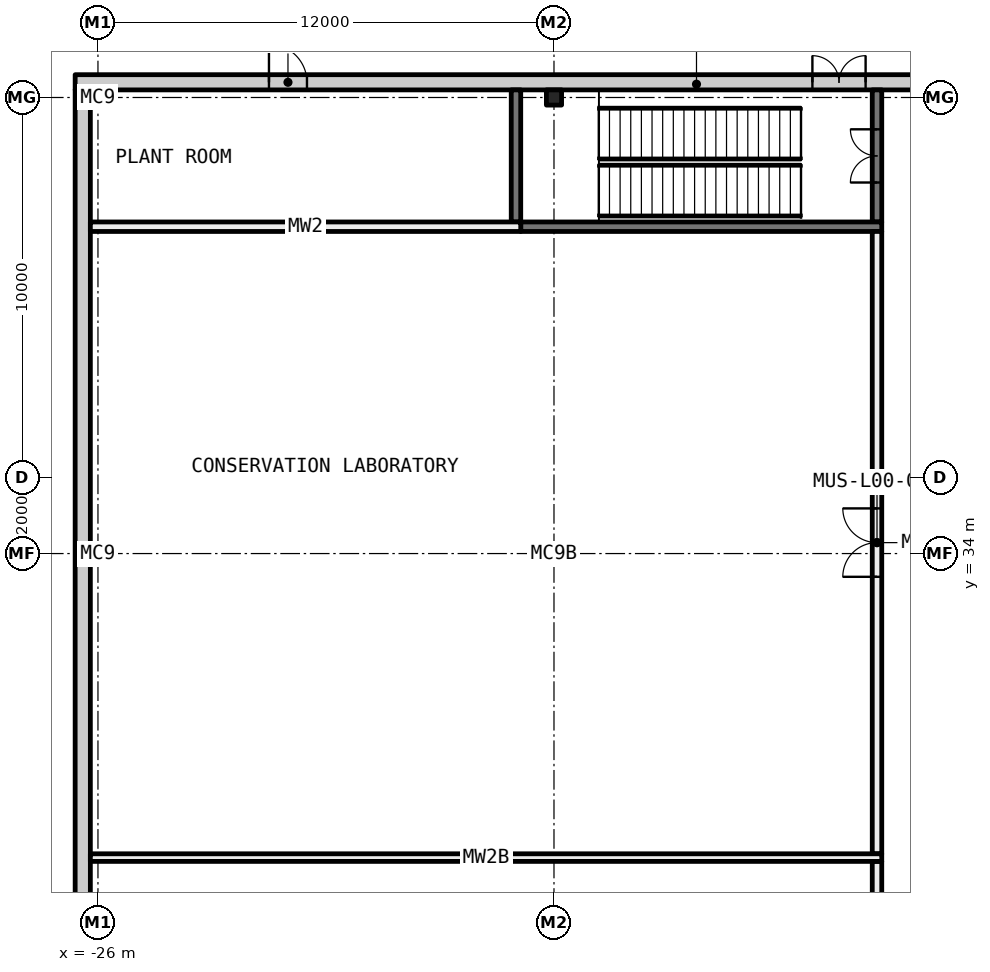
"""IFC4 building model, lengths in metres.
Left out: names, types, materials, properties, quantities, classifications, styles, units other than length and angle.
Written with IfcOpenShell. Run it as: python <this file> out.ifc"""

import sys

from ifc_helpers import new_model, si_unit, direction, frame, frame_2d, origin, origin_2d, place, context, subcontext, project, spatial, rectangle, i_section, extrude, element, fill, save


model = new_model("IFC4")
c1 = context("Model", 3, precision=1e-05, world=origin(), true_north=direction((0.0, 1.0)))
c2 = subcontext(c1, "Body", "Model", "MODEL_VIEW")
j1 = project(units=[si_unit("LENGTHUNIT", "METRE"), si_unit("PLANEANGLEUNIT", "RADIAN")], contexts=[c1])
p1 = place(None, origin())
s1 = spatial("IfcSite", under=j1, at=p1, CompositionType="ELEMENT")
p2 = place(p1, origin())
s2 = spatial("IfcBuilding", under=s1, at=p2, CompositionType="ELEMENT")
p3 = place(p2, origin())
s3 = spatial("IfcBuildingStorey", under=s2, at=p3, CompositionType="ELEMENT", Elevation=0.0)
for number, where, z_axis, x_axis in (
    (1, (-26.0, 34.0, -1.0), (0.0, 0.0, 1.0), (1.0, 0.0, 0.0)),
    (2, (-26.0, 46.0, -1.0), (0.0, 0.0, 1.0), (1.0, 0.0, 0.0)),
    (3, (-14.0, 34.0, -1.0), (0.0, 0.0, 1.0), (1.0, 0.0, 0.0)),
    (4, (-14.0, 46.0, -1.0), (0.0, 0.0, 1.0), (1.0, 0.0, 0.0)),
):
    element("IfcColumn", number, at=place(p3, frame(where, z_axis=z_axis, x_axis=x_axis)), inside=s3, PredefinedType="COLUMN", context=c2, shape_type="SweptSolid", body=[
        extrude(i_section(OverallWidth=0.4, OverallDepth=0.4, WebThickness=0.013, FlangeThickness=0.021, FilletRadius=0.022, at=origin_2d()), origin(), (0.0, 0.0, 1.0), 6.6),
    ])
p4 = place(p3, frame((-5.5, 12.1, 0.0), z_axis=(0.0, 0.0, 1.0), x_axis=(0.0, 1.0, 0.0)))
e5 = element("IfcWall", 5, at=p4, inside=s3, PredefinedType="PARTITIONING", context=c2, shape_type="SweptSolid", body=[
    extrude(rectangle(XDim=13.8, YDim=0.25, at=frame_2d((6.9, 0.0))), origin(), (0.0, 0.0, 1.0), 5.6),
])
p5 = place(p4, frame((6.0, 0.0, 0.0)))
e6 = element("IfcOpeningElement", 6, at=p5, cuts=e5, PredefinedType="OPENING", context=c2, shape_type="SweptSolid", body=[
    extrude(rectangle(XDim=1.8, YDim=2.1, at=frame_2d((0.9, 1.05))), frame((0.0, 0.135, 0.0), z_axis=(0.0, -1.0, 0.0), x_axis=(1.0, 0.0, 0.0)), (0.0, 0.0, 1.0), 0.27),
])
p6 = place(p3, frame((-5.5, 26.1, 0.0), z_axis=(0.0, 0.0, 1.0), x_axis=(0.0, 1.0, 0.0)))
e7 = element("IfcWall", 7, at=p6, inside=s3, PredefinedType="PARTITIONING", context=c2, shape_type="SweptSolid", body=[
    extrude(rectangle(XDim=16.375, YDim=0.25, at=frame_2d((8.188, 0.0))), origin(), (0.0, 0.0, 1.0), 5.6),
])
p7 = place(p6, frame((7.288, 0.0, 0.0)))
e8 = element("IfcOpeningElement", 8, at=p7, cuts=e7, PredefinedType="OPENING", context=c2, shape_type="SweptSolid", body=[
    extrude(rectangle(XDim=1.8, YDim=2.1, at=frame_2d((0.9, 1.05))), frame((0.0, 0.135, 0.0), z_axis=(0.0, -1.0, 0.0), x_axis=(1.0, 0.0, 0.0)), (0.0, 0.0, 1.0), 0.27),
])
p8 = place(p3, frame((-5.5, 42.725, -1.0), z_axis=(0.0, 0.0, 1.0), x_axis=(0.0, 1.0, 0.0)))
e9 = element("IfcWall", 9, at=p8, inside=s3, PredefinedType="SHEAR", context=c2, shape_type="SweptSolid", body=[
    extrude(rectangle(XDim=3.475, YDim=0.25, at=frame_2d((1.737, 0.0))), origin(), (0.0, 0.0, 1.0), 6.6),
])
p9 = place(p8, frame((1.038, 0.0, 1.0)))
e10 = element("IfcOpeningElement", 10, at=p9, cuts=e9, PredefinedType="OPENING", context=c2, shape_type="SweptSolid", body=[
    extrude(rectangle(XDim=1.4, YDim=2.1, at=frame_2d((0.7, 1.05))), frame((0.0, 0.135, 0.0), z_axis=(0.0, -1.0, 0.0), x_axis=(1.0, 0.0, 0.0)), (0.0, 0.0, 1.0), 0.27),
])
p10 = place(p3, frame((-26.2, 26.0, 0.0), z_axis=(0.0, 0.0, 1.0), x_axis=(1.0, 0.0, 0.0)))
e11 = element("IfcWall", 11, at=p10, inside=s3, PredefinedType="PARTITIONING", context=c2, shape_type="SweptSolid", body=[
    extrude(rectangle(XDim=20.825, YDim=0.2, at=frame_2d((10.413, 0.0))), origin(), (0.0, 0.0, 1.0), 5.6),
])
p11 = place(p3, frame((-26.2, 42.6, 0.0), z_axis=(0.0, 0.0, 1.0), x_axis=(1.0, 0.0, 0.0)))
e12 = element("IfcWall", 12, at=p11, inside=s3, PredefinedType="PARTITIONING", context=c2, shape_type="SweptSolid", body=[
    extrude(rectangle(XDim=11.325, YDim=0.25, at=frame_2d((5.663, 0.0))), origin(), (0.0, 0.0, 1.0), 5.6),
])
p12 = place(p3, frame((-14.875, 42.6, -1.0), z_axis=(0.0, 0.0, 1.0), x_axis=(1.0, 0.0, 0.0)))
e13 = element("IfcWall", 13, at=p12, inside=s3, PredefinedType="SHEAR", context=c2, shape_type="SweptSolid", body=[
    extrude(rectangle(XDim=9.5, YDim=0.25, at=frame_2d((4.75, 0.0))), origin(), (0.0, 0.0, 1.0), 6.6),
])
p13 = place(p3, frame((-15.0, 42.725, -1.0), z_axis=(0.0, 0.0, 1.0), x_axis=(0.0, 1.0, 0.0)))
e14 = element("IfcWall", 14, at=p13, inside=s3, PredefinedType="SHEAR", context=c2, shape_type="SweptSolid", body=[
    extrude(rectangle(XDim=3.475, YDim=0.25, at=frame_2d((1.737, 0.0))), origin(), (0.0, 0.0, 1.0), 6.6),
])
p14 = place(p3, frame((-26.4, -26.2, -0.4), z_axis=(0.0, 0.0, 1.0), x_axis=(0.0, 1.0, 0.0)))
e15 = element("IfcWall", 15, at=p14, inside=s3, PredefinedType="STANDARD", context=c2, shape_type="SweptSolid", body=[
    extrude(rectangle(XDim=72.4, YDim=0.4, at=frame_2d((36.2, 0.0))), origin(), (0.0, 0.0, 1.0), 6.0),
])
p15 = place(p14, frame((29.4, 0.0, 0.4)))
e16 = element("IfcOpeningElement", 16, at=p15, cuts=e15, PredefinedType="OPENING", context=c2, shape_type="SweptSolid", body=[
    extrude(rectangle(XDim=3.6, YDim=4.2, at=frame_2d((1.8, 2.1))), frame((0.0, 0.21, 0.0), z_axis=(0.0, -1.0, 0.0), x_axis=(1.0, 0.0, 0.0)), (0.0, 0.0, 1.0), 0.42),
])
p16 = place(p14, frame((2.0, 0.0, 0.4)))
e17 = element("IfcOpeningElement", 17, at=p16, cuts=e15, PredefinedType="OPENING", context=c2, shape_type="SweptSolid", body=[
    extrude(rectangle(XDim=2.4, YDim=2.4, at=frame_2d((1.2, 1.2))), frame((0.0, 0.21, 0.0), z_axis=(0.0, -1.0, 0.0), x_axis=(1.0, 0.0, 0.0)), (0.0, 0.0, 1.0), 0.42),
])
p17 = place(p14, frame((7.5, 0.0, 0.4)))
e18 = element("IfcOpeningElement", 18, at=p17, cuts=e15, PredefinedType="OPENING", context=c2, shape_type="SweptSolid", body=[
    extrude(rectangle(XDim=2.4, YDim=2.4, at=frame_2d((1.2, 1.2))), frame((0.0, 0.21, 0.0), z_axis=(0.0, -1.0, 0.0), x_axis=(1.0, 0.0, 0.0)), (0.0, 0.0, 1.0), 0.42),
])
p18 = place(p3, frame((-26.6, 46.4, -0.4), z_axis=(0.0, 0.0, 1.0), x_axis=(1.0, 0.0, 0.0)))
e19 = element("IfcWall", 19, at=p18, inside=s3, PredefinedType="STANDARD", context=c2, shape_type="SweptSolid", body=[
    extrude(rectangle(XDim=25.2, YDim=0.4, at=frame_2d((12.6, 0.0))), origin(), (0.0, 0.0, 1.0), 6.0),
])
p19 = place(p18, frame((19.4, 0.0, 0.4)))
e20 = element("IfcOpeningElement", 20, at=p19, cuts=e19, PredefinedType="OPENING", context=c2, shape_type="SweptSolid", body=[
    extrude(rectangle(XDim=1.4, YDim=2.1, at=frame_2d((0.7, 1.05))), frame((0.0, 0.21, 0.0), z_axis=(0.0, -1.0, 0.0), x_axis=(1.0, 0.0, 0.0)), (0.0, 0.0, 1.0), 0.42),
])
p20 = place(p18, frame((5.1, 0.0, 0.4)))
e21 = element("IfcOpeningElement", 21, at=p20, cuts=e19, PredefinedType="OPENING", context=c2, shape_type="SweptSolid", body=[
    extrude(rectangle(XDim=1.0, YDim=2.1, at=frame_2d((0.5, 1.05))), frame((0.0, 0.21, 0.0), z_axis=(0.0, -1.0, 0.0), x_axis=(1.0, 0.0, 0.0)), (0.0, 0.0, 1.0), 0.42),
])
p21 = place(p19, origin())
e22 = element("IfcDoor", 22, at=p21, inside=s3, OperationType="DOUBLE_DOOR_SINGLE_SWING", PredefinedType="DOOR", context=c2, shape_type="SweptSolid", body=[
    extrude(rectangle(XDim=1.4, YDim=2.1, at=frame_2d((0.7, 1.05))), frame((0.0, 0.025, 0.0), z_axis=(0.0, -1.0, 0.0), x_axis=(1.0, 0.0, 0.0)), (0.0, 0.0, 1.0), 0.05),
])
fill(e20, e22)
p22 = place(p20, origin())
e23 = element("IfcDoor", 23, at=p22, inside=s3, OperationType="SINGLE_SWING_RIGHT", PredefinedType="DOOR", context=c2, shape_type="SweptSolid", body=[
    extrude(rectangle(XDim=1.0, YDim=2.1, at=frame_2d((0.5, 1.05))), frame((0.0, 0.025, 0.0), z_axis=(0.0, -1.0, 0.0), x_axis=(1.0, 0.0, 0.0)), (0.0, 0.0, 1.0), 0.05),
])
fill(e21, e23)
p23 = place(p9, origin())
e24 = element("IfcDoor", 24, at=p23, inside=s3, OperationType="DOUBLE_DOOR_SINGLE_SWING", PredefinedType="DOOR", context=c2, shape_type="SweptSolid", body=[
    extrude(rectangle(XDim=1.4, YDim=2.1, at=frame_2d((0.7, 1.05))), frame((0.0, 0.025, 0.0), z_axis=(0.0, -1.0, 0.0), x_axis=(1.0, 0.0, 0.0)), (0.0, 0.0, 1.0), 0.05),
])
fill(e10, e24)
p24 = place(p7, origin())
e25 = element("IfcDoor", 25, at=p24, inside=s3, OperationType="DOUBLE_DOOR_SINGLE_SWING", PredefinedType="DOOR", context=c2, shape_type="SweptSolid", body=[
    extrude(rectangle(XDim=1.8, YDim=2.1, at=frame_2d((0.9, 1.05))), frame((0.0, 0.025, 0.0), z_axis=(0.0, -1.0, 0.0), x_axis=(1.0, 0.0, 0.0)), (0.0, 0.0, 1.0), 0.05),
])
fill(e8, e25)
save(model, sys.argv[1])
